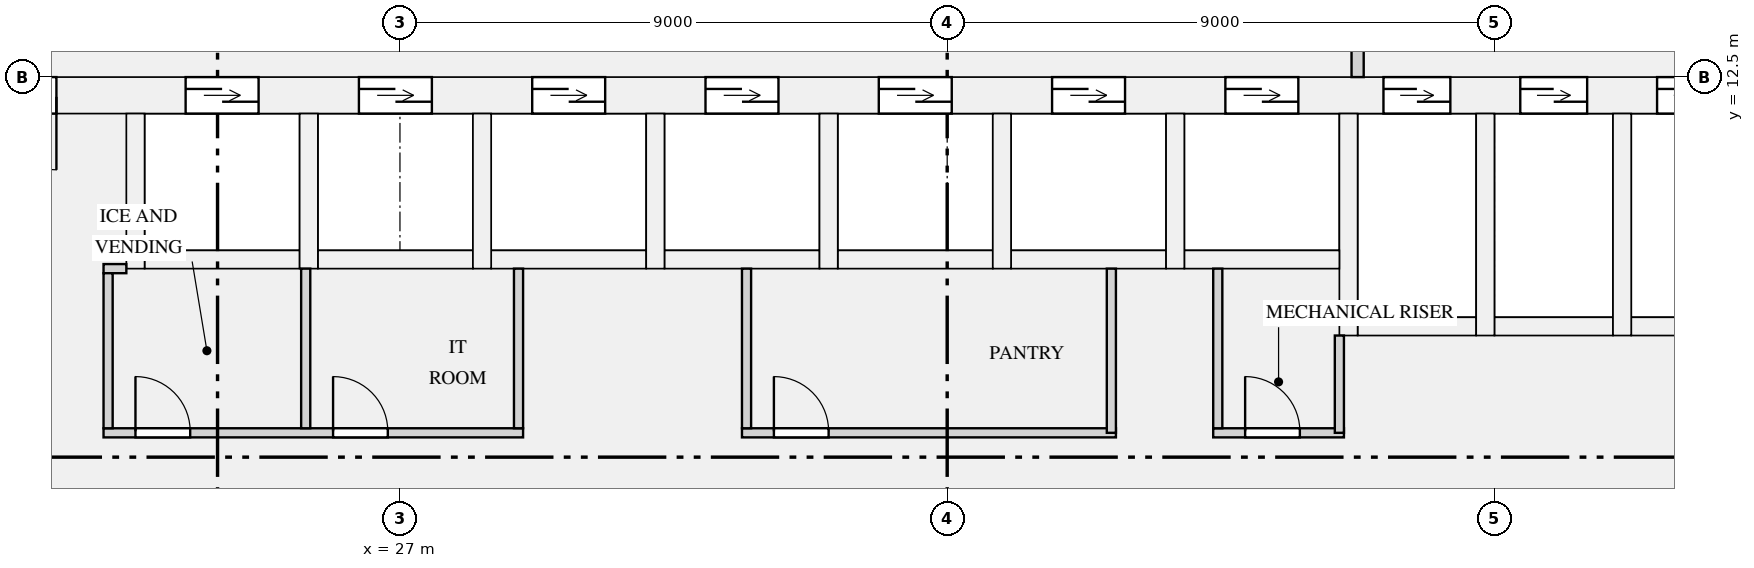
"""IFC4 building model, lengths in metres.
Left out: names, types, materials, properties, quantities, classifications, styles, units other than length and angle.
Written with IfcOpenShell. Run it as: python <this file> out.ifc"""

import sys

from ifc_helpers import new_model, si_unit, direction, frame, frame_2d, origin, place, context, subcontext, project, spatial, rectangle, extrude, element, fill, save


model = new_model("IFC4")
c1 = context("Model", 3, precision=1e-05, world=origin(), true_north=direction((0.0, 1.0)))
c2 = subcontext(c1, "Body", "Model", "MODEL_VIEW")
j1 = project(units=[si_unit("LENGTHUNIT", "METRE"), si_unit("PLANEANGLEUNIT", "RADIAN")], contexts=[c1])
p1 = place(None, origin())
s1 = spatial("IfcSite", under=j1, at=p1, CompositionType="ELEMENT")
p2 = place(p1, origin())
s2 = spatial("IfcBuilding", under=s1, at=p2, CompositionType="ELEMENT")
p3 = place(p2, frame((0.0, 0.0, 77.25)))
s3 = spatial("IfcBuildingStorey", under=s2, at=p3, CompositionType="ELEMENT", Elevation=77.25)
p4 = place(p3, frame((18.8, 12.2, 0.0), z_axis=(0.0, 0.0, 1.0), x_axis=(1.0, 0.0, 0.0)))
e1 = element("IfcWall", 1, at=p4, inside=s3, PredefinedType="SHEAR", context=c2, shape_type="SweptSolid", body=[
    extrude(rectangle(XDim=34.4, YDim=0.6, at=frame_2d((17.2, 0.0))), origin(), (0.0, 0.0, 1.0), 6.3),
])
p5 = place(p4, frame((4.675, 0.0, 0.0)))
e2 = element("IfcOpeningElement", 2, at=p5, cuts=e1, PredefinedType="OPENING", context=c2, shape_type="SweptSolid", body=[
    extrude(rectangle(XDim=1.2, YDim=2.1, at=frame_2d((0.6, 1.05))), frame((0.0, 0.31, 0.0), z_axis=(0.0, -1.0, 0.0), x_axis=(1.0, 0.0, 0.0)), (0.0, 0.0, 1.0), 0.62),
])
p6 = place(p4, frame((7.525, 0.0, 0.0)))
e3 = element("IfcOpeningElement", 3, at=p6, cuts=e1, PredefinedType="OPENING", context=c2, shape_type="SweptSolid", body=[
    extrude(rectangle(XDim=1.2, YDim=2.1, at=frame_2d((0.6, 1.05))), frame((0.0, 0.31, 0.0), z_axis=(0.0, -1.0, 0.0), x_axis=(1.0, 0.0, 0.0)), (0.0, 0.0, 1.0), 0.62),
])
p7 = place(p4, frame((10.375, 0.0, 0.0)))
e4 = element("IfcOpeningElement", 4, at=p7, cuts=e1, PredefinedType="OPENING", context=c2, shape_type="SweptSolid", body=[
    extrude(rectangle(XDim=1.2, YDim=2.1, at=frame_2d((0.6, 1.05))), frame((0.0, 0.31, 0.0), z_axis=(0.0, -1.0, 0.0), x_axis=(1.0, 0.0, 0.0)), (0.0, 0.0, 1.0), 0.62),
])
p8 = place(p4, frame((13.225, 0.0, 0.0)))
e5 = element("IfcOpeningElement", 5, at=p8, cuts=e1, PredefinedType="OPENING", context=c2, shape_type="SweptSolid", body=[
    extrude(rectangle(XDim=1.2, YDim=2.1, at=frame_2d((0.6, 1.05))), frame((0.0, 0.31, 0.0), z_axis=(0.0, -1.0, 0.0), x_axis=(1.0, 0.0, 0.0)), (0.0, 0.0, 1.0), 0.62),
])
p9 = place(p4, frame((16.075, 0.0, 0.0)))
e6 = element("IfcOpeningElement", 6, at=p9, cuts=e1, PredefinedType="OPENING", context=c2, shape_type="SweptSolid", body=[
    extrude(rectangle(XDim=1.2, YDim=2.1, at=frame_2d((0.6, 1.05))), frame((0.0, 0.31, 0.0), z_axis=(0.0, -1.0, 0.0), x_axis=(1.0, 0.0, 0.0)), (0.0, 0.0, 1.0), 0.62),
])
p10 = place(p4, frame((18.925, 0.0, 0.0)))
e7 = element("IfcOpeningElement", 7, at=p10, cuts=e1, PredefinedType="OPENING", context=c2, shape_type="SweptSolid", body=[
    extrude(rectangle(XDim=1.2, YDim=2.1, at=frame_2d((0.6, 1.05))), frame((0.0, 0.31, 0.0), z_axis=(0.0, -1.0, 0.0), x_axis=(1.0, 0.0, 0.0)), (0.0, 0.0, 1.0), 0.62),
])
p11 = place(p4, frame((21.775, 0.0, 0.0)))
e8 = element("IfcOpeningElement", 8, at=p11, cuts=e1, PredefinedType="OPENING", context=c2, shape_type="SweptSolid", body=[
    extrude(rectangle(XDim=1.2, YDim=2.1, at=frame_2d((0.6, 1.05))), frame((0.0, 0.31, 0.0), z_axis=(0.0, -1.0, 0.0), x_axis=(1.0, 0.0, 0.0)), (0.0, 0.0, 1.0), 0.62),
])
p12 = place(p4, frame((24.375, 0.0, 0.0)))
e9 = element("IfcOpeningElement", 9, at=p12, cuts=e1, PredefinedType="OPENING", context=c2, shape_type="SweptSolid", body=[
    extrude(rectangle(XDim=1.1, YDim=2.1, at=frame_2d((0.55, 1.05))), frame((0.0, 0.31, 0.0), z_axis=(0.0, -1.0, 0.0), x_axis=(1.0, 0.0, 0.0)), (0.0, 0.0, 1.0), 0.62),
])
p13 = place(p4, frame((26.625, 0.0, 0.0)))
e10 = element("IfcOpeningElement", 10, at=p13, cuts=e1, PredefinedType="OPENING", context=c2, shape_type="SweptSolid", body=[
    extrude(rectangle(XDim=1.1, YDim=2.1, at=frame_2d((0.55, 1.05))), frame((0.0, 0.31, 0.0), z_axis=(0.0, -1.0, 0.0), x_axis=(1.0, 0.0, 0.0)), (0.0, 0.0, 1.0), 0.62),
])
p14 = place(p4, frame((28.875, 0.0, 0.0)))
e11 = element("IfcOpeningElement", 11, at=p14, cuts=e1, PredefinedType="OPENING", context=c2, shape_type="SweptSolid", body=[
    extrude(rectangle(XDim=1.1, YDim=2.1, at=frame_2d((0.55, 1.05))), frame((0.0, 0.31, 0.0), z_axis=(0.0, -1.0, 0.0), x_axis=(1.0, 0.0, 0.0)), (0.0, 0.0, 1.0), 0.62),
])
p15 = place(p4, frame((1.35, 0.0, 0.0)))
e12 = element("IfcOpeningElement", 12, at=p15, cuts=e1, PredefinedType="OPENING", context=c2, shape_type="SweptSolid", body=[
    extrude(rectangle(XDim=1.2, YDim=2.1, at=frame_2d((0.6, 1.05))), frame((0.0, 0.31, 0.0), z_axis=(0.0, -1.0, 0.0), x_axis=(1.0, 0.0, 0.0)), (0.0, 0.0, 1.0), 0.62),
])
p16 = place(p4, frame((31.85, 0.0, 0.0)))
e13 = element("IfcOpeningElement", 13, at=p16, cuts=e1, PredefinedType="OPENING", context=c2, shape_type="SweptSolid", body=[
    extrude(rectangle(XDim=1.2, YDim=2.1, at=frame_2d((0.6, 1.05))), frame((0.0, 0.31, 0.0), z_axis=(0.0, -1.0, 0.0), x_axis=(1.0, 0.0, 0.0)), (0.0, 0.0, 1.0), 0.62),
])
p17 = place(p3, frame((22.8, 9.5, 0.0), z_axis=(0.0, 0.0, 1.0), x_axis=(1.0, 0.0, 0.0)))
e14 = element("IfcWall", 14, at=p17, inside=s3, PredefinedType="SHEAR", context=c2, shape_type="SweptSolid", body=[
    extrude(rectangle(XDim=2.55, YDim=0.3, at=frame_2d((1.275, 0.0))), origin(), (0.0, 0.0, 1.0), 6.3),
])
p18 = place(p3, frame((22.65, 9.35, 0.0), z_axis=(0.0, 0.0, 1.0), x_axis=(0.0, 1.0, 0.0)))
e15 = element("IfcWall", 15, at=p18, inside=s3, PredefinedType="SHEAR", context=c2, shape_type="SweptSolid", body=[
    extrude(rectangle(XDim=2.55, YDim=0.3, at=frame_2d((1.275, 0.0))), origin(), (0.0, 0.0, 1.0), 6.3),
])
p19 = place(p3, frame((25.65, 9.5, 0.0), z_axis=(0.0, 0.0, 1.0), x_axis=(1.0, 0.0, 0.0)))
e16 = element("IfcWall", 16, at=p19, inside=s3, PredefinedType="SHEAR", context=c2, shape_type="SweptSolid", body=[
    extrude(rectangle(XDim=2.55, YDim=0.3, at=frame_2d((1.275, 0.0))), origin(), (0.0, 0.0, 1.0), 6.3),
])
p20 = place(p3, frame((25.5, 9.35, 0.0), z_axis=(0.0, 0.0, 1.0), x_axis=(0.0, 1.0, 0.0)))
e17 = element("IfcWall", 17, at=p20, inside=s3, PredefinedType="SHEAR", context=c2, shape_type="SweptSolid", body=[
    extrude(rectangle(XDim=2.55, YDim=0.3, at=frame_2d((1.275, 0.0))), origin(), (0.0, 0.0, 1.0), 6.3),
])
p21 = place(p3, frame((28.5, 9.5, 0.0), z_axis=(0.0, 0.0, 1.0), x_axis=(1.0, 0.0, 0.0)))
e18 = element("IfcWall", 18, at=p21, inside=s3, PredefinedType="SHEAR", context=c2, shape_type="SweptSolid", body=[
    extrude(rectangle(XDim=2.55, YDim=0.3, at=frame_2d((1.275, 0.0))), origin(), (0.0, 0.0, 1.0), 6.3),
])
for number, where, z_axis, x_axis in (
    (19, (28.35, 9.35, 0.0), (0.0, 0.0, 1.0), (0.0, 1.0, 0.0)),
    (20, (31.35, 9.5, 0.0), (0.0, 0.0, 1.0), (1.0, 0.0, 0.0)),
    (21, (31.2, 9.35, 0.0), (0.0, 0.0, 1.0), (0.0, 1.0, 0.0)),
):
    element("IfcWall", number, at=place(p3, frame(where, z_axis=z_axis, x_axis=x_axis)), inside=s3, PredefinedType="SHEAR", context=c2, shape_type="SweptSolid", body=[
        extrude(rectangle(XDim=2.55, YDim=0.3, at=frame_2d((1.275, 0.0))), origin(), (0.0, 0.0, 1.0), 6.3),
    ])
p22 = place(p3, frame((34.2, 9.5, 0.0), z_axis=(0.0, 0.0, 1.0), x_axis=(1.0, 0.0, 0.0)))
e22 = element("IfcWall", 22, at=p22, inside=s3, PredefinedType="SHEAR", context=c2, shape_type="SweptSolid", body=[
    extrude(rectangle(XDim=2.55, YDim=0.3, at=frame_2d((1.275, 0.0))), origin(), (0.0, 0.0, 1.0), 6.3),
])
p23 = place(p3, frame((34.05, 9.35, 0.0), z_axis=(0.0, 0.0, 1.0), x_axis=(0.0, 1.0, 0.0)))
e23 = element("IfcWall", 23, at=p23, inside=s3, PredefinedType="SHEAR", context=c2, shape_type="SweptSolid", body=[
    extrude(rectangle(XDim=2.55, YDim=0.3, at=frame_2d((1.275, 0.0))), origin(), (0.0, 0.0, 1.0), 6.3),
])
p24 = place(p3, frame((37.05, 9.5, 0.0), z_axis=(0.0, 0.0, 1.0), x_axis=(1.0, 0.0, 0.0)))
e24 = element("IfcWall", 24, at=p24, inside=s3, PredefinedType="SHEAR", context=c2, shape_type="SweptSolid", body=[
    extrude(rectangle(XDim=2.55, YDim=0.3, at=frame_2d((1.275, 0.0))), origin(), (0.0, 0.0, 1.0), 6.3),
])
p25 = place(p3, frame((36.9, 9.35, 0.0), z_axis=(0.0, 0.0, 1.0), x_axis=(0.0, 1.0, 0.0)))
e25 = element("IfcWall", 25, at=p25, inside=s3, PredefinedType="SHEAR", context=c2, shape_type="SweptSolid", body=[
    extrude(rectangle(XDim=2.55, YDim=0.3, at=frame_2d((1.275, 0.0))), origin(), (0.0, 0.0, 1.0), 6.3),
])
p26 = place(p3, frame((39.9, 9.5, 0.0), z_axis=(0.0, 0.0, 1.0), x_axis=(1.0, 0.0, 0.0)))
e26 = element("IfcWall", 26, at=p26, inside=s3, PredefinedType="SHEAR", context=c2, shape_type="SweptSolid", body=[
    extrude(rectangle(XDim=2.55, YDim=0.3, at=frame_2d((1.275, 0.0))), origin(), (0.0, 0.0, 1.0), 6.3),
])
p27 = place(p3, frame((39.75, 9.35, 0.0), z_axis=(0.0, 0.0, 1.0), x_axis=(0.0, 1.0, 0.0)))
e27 = element("IfcWall", 27, at=p27, inside=s3, PredefinedType="SHEAR", context=c2, shape_type="SweptSolid", body=[
    extrude(rectangle(XDim=2.55, YDim=0.3, at=frame_2d((1.275, 0.0))), origin(), (0.0, 0.0, 1.0), 6.3),
])
p28 = place(p3, frame((42.75, 8.4, 0.0), z_axis=(0.0, 0.0, 1.0), x_axis=(1.0, 0.0, 0.0)))
e28 = element("IfcWall", 28, at=p28, inside=s3, PredefinedType="SHEAR", context=c2, shape_type="SweptSolid", body=[
    extrude(rectangle(XDim=1.95, YDim=0.3, at=frame_2d((0.975, 0.0))), origin(), (0.0, 0.0, 1.0), 6.3),
])
p29 = place(p3, frame((42.6, 8.25, 0.0), z_axis=(0.0, 0.0, 1.0), x_axis=(0.0, 1.0, 0.0)))
e29 = element("IfcWall", 29, at=p29, inside=s3, PredefinedType="SHEAR", context=c2, shape_type="SweptSolid", body=[
    extrude(rectangle(XDim=3.65, YDim=0.3, at=frame_2d((1.825, 0.0))), origin(), (0.0, 0.0, 1.0), 6.3),
])
p30 = place(p3, frame((45.0, 8.4, 0.0), z_axis=(0.0, 0.0, 1.0), x_axis=(1.0, 0.0, 0.0)))
e30 = element("IfcWall", 30, at=p30, inside=s3, PredefinedType="SHEAR", context=c2, shape_type="SweptSolid", body=[
    extrude(rectangle(XDim=1.95, YDim=0.3, at=frame_2d((0.975, 0.0))), origin(), (0.0, 0.0, 1.0), 6.3),
])
p31 = place(p3, frame((44.85, 8.25, 0.0), z_axis=(0.0, 0.0, 1.0), x_axis=(0.0, 1.0, 0.0)))
e31 = element("IfcWall", 31, at=p31, inside=s3, PredefinedType="SHEAR", context=c2, shape_type="SweptSolid", body=[
    extrude(rectangle(XDim=3.65, YDim=0.3, at=frame_2d((1.825, 0.0))), origin(), (0.0, 0.0, 1.0), 6.3),
])
p32 = place(p3, frame((47.25, 8.4, 0.0), z_axis=(0.0, 0.0, 1.0), x_axis=(1.0, 0.0, 0.0)))
e32 = element("IfcWall", 32, at=p32, inside=s3, PredefinedType="SHEAR", context=c2, shape_type="SweptSolid", body=[
    extrude(rectangle(XDim=1.95, YDim=0.3, at=frame_2d((0.975, 0.0))), origin(), (0.0, 0.0, 1.0), 6.3),
])
p33 = place(p3, frame((47.1, 8.25, 0.0), z_axis=(0.0, 0.0, 1.0), x_axis=(0.0, 1.0, 0.0)))
e33 = element("IfcWall", 33, at=p33, inside=s3, PredefinedType="SHEAR", context=c2, shape_type="SweptSolid", body=[
    extrude(rectangle(XDim=3.65, YDim=0.3, at=frame_2d((1.825, 0.0))), origin(), (0.0, 0.0, 1.0), 6.3),
])
p34 = place(p3, frame((22.125, 6.65, 0.0), z_axis=(0.0, 0.0, 1.0), x_axis=(1.0, 0.0, 0.0)))
e34 = element("IfcWall", 34, at=p34, inside=s3, PredefinedType="PARTITIONING", context=c2, shape_type="SweptSolid", body=[
    extrude(rectangle(XDim=6.9, YDim=0.15, at=frame_2d((3.45, 0.0))), origin(), (0.0, 0.0, 1.0), 5.98),
])
p35 = place(p34, frame((0.525, 0.0, 0.0)))
e35 = element("IfcOpeningElement", 35, at=p35, cuts=e34, PredefinedType="OPENING", context=c2, shape_type="SweptSolid", body=[
    extrude(rectangle(XDim=0.9, YDim=2.1, at=frame_2d((0.45, 1.05))), frame((0.0, 0.085, 0.0), z_axis=(0.0, -1.0, 0.0), x_axis=(1.0, 0.0, 0.0)), (0.0, 0.0, 1.0), 0.17),
])
p36 = place(p34, frame((3.775, 0.0, 0.0)))
e36 = element("IfcOpeningElement", 36, at=p36, cuts=e34, PredefinedType="OPENING", context=c2, shape_type="SweptSolid", body=[
    extrude(rectangle(XDim=0.9, YDim=2.1, at=frame_2d((0.45, 1.05))), frame((0.0, 0.085, 0.0), z_axis=(0.0, -1.0, 0.0), x_axis=(1.0, 0.0, 0.0)), (0.0, 0.0, 1.0), 0.17),
])
p37 = place(p3, frame((32.625, 6.65, 0.0), z_axis=(0.0, 0.0, 1.0), x_axis=(1.0, 0.0, 0.0)))
e37 = element("IfcWall", 37, at=p37, inside=s3, PredefinedType="PARTITIONING", context=c2, shape_type="SweptSolid", body=[
    extrude(rectangle(XDim=6.15, YDim=0.15, at=frame_2d((3.075, 0.0))), origin(), (0.0, 0.0, 1.0), 5.98),
])
p38 = place(p37, frame((0.525, 0.0, 0.0)))
e38 = element("IfcOpeningElement", 38, at=p38, cuts=e37, PredefinedType="OPENING", context=c2, shape_type="SweptSolid", body=[
    extrude(rectangle(XDim=0.9, YDim=2.1, at=frame_2d((0.45, 1.05))), frame((0.0, 0.085, 0.0), z_axis=(0.0, -1.0, 0.0), x_axis=(1.0, 0.0, 0.0)), (0.0, 0.0, 1.0), 0.17),
])
p39 = place(p3, frame((40.375, 6.65, 0.0), z_axis=(0.0, 0.0, 1.0), x_axis=(1.0, 0.0, 0.0)))
e39 = element("IfcWall", 39, at=p39, inside=s3, PredefinedType="PARTITIONING", context=c2, shape_type="SweptSolid", body=[
    extrude(rectangle(XDim=2.15, YDim=0.15, at=frame_2d((1.075, 0.0))), origin(), (0.0, 0.0, 1.0), 5.98),
])
p40 = place(p39, frame((0.525, 0.0, 0.0)))
e40 = element("IfcOpeningElement", 40, at=p40, cuts=e39, PredefinedType="OPENING", context=c2, shape_type="SweptSolid", body=[
    extrude(rectangle(XDim=0.9, YDim=2.1, at=frame_2d((0.45, 1.05))), frame((0.0, 0.085, 0.0), z_axis=(0.0, -1.0, 0.0), x_axis=(1.0, 0.0, 0.0)), (0.0, 0.0, 1.0), 0.17),
])
p41 = place(p3, frame((22.125, 9.35, 0.0), z_axis=(0.0, 0.0, 1.0), x_axis=(1.0, 0.0, 0.0)))
e41 = element("IfcWall", 41, at=p41, inside=s3, PredefinedType="PARTITIONING", context=c2, shape_type="SweptSolid", body=[
    extrude(rectangle(XDim=0.375, YDim=0.15, at=frame_2d((0.188, 0.0))), origin(), (0.0, 0.0, 1.0), 5.98),
])
p42 = place(p3, frame((38.7, 6.65, 0.0), z_axis=(0.0, 0.0, 1.0), x_axis=(0.0, 1.0, 0.0)))
e42 = element("IfcWall", 42, at=p42, inside=s3, PredefinedType="PARTITIONING", context=c2, shape_type="SweptSolid", body=[
    extrude(rectangle(XDim=2.7, YDim=0.15, at=frame_2d((1.35, 0.0))), origin(), (0.0, 0.0, 1.0), 5.98),
])
p43 = place(p3, frame((42.45, 6.65, 0.0), z_axis=(0.0, 0.0, 1.0), x_axis=(0.0, 1.0, 0.0)))
e43 = element("IfcWall", 43, at=p43, inside=s3, PredefinedType="PARTITIONING", context=c2, shape_type="SweptSolid", body=[
    extrude(rectangle(XDim=1.6, YDim=0.15, at=frame_2d((0.8, 0.0))), origin(), (0.0, 0.0, 1.0), 5.98),
])
p44 = place(p3, frame((22.2, 6.725, 0.0), z_axis=(0.0, 0.0, 1.0), x_axis=(0.0, 1.0, 0.0)))
e44 = element("IfcWall", 44, at=p44, inside=s3, PredefinedType="PARTITIONING", context=c2, shape_type="SweptSolid", body=[
    extrude(rectangle(XDim=2.55, YDim=0.15, at=frame_2d((1.275, 0.0))), origin(), (0.0, 0.0, 1.0), 5.98),
])
for number, where, z_axis, x_axis in (
    (45, (25.45, 6.725, 0.0), (0.0, 0.0, 1.0), (0.0, 1.0, 0.0)),
    (46, (28.95, 6.725, 0.0), (0.0, 0.0, 1.0), (0.0, 1.0, 0.0)),
    (47, (32.7, 6.725, 0.0), (0.0, 0.0, 1.0), (0.0, 1.0, 0.0)),
    (48, (40.45, 6.725, 0.0), (0.0, 0.0, 1.0), (0.0, 1.0, 0.0)),
):
    element("IfcWall", number, at=place(p3, frame(where, z_axis=z_axis, x_axis=x_axis)), inside=s3, PredefinedType="PARTITIONING", context=c2, shape_type="SweptSolid", body=[
        extrude(rectangle(XDim=2.625, YDim=0.15, at=frame_2d((1.312, 0.0))), origin(), (0.0, 0.0, 1.0), 5.98),
    ])
p45 = place(p3, frame((42.75, 12.5, 0.0), z_axis=(0.0, 0.0, 1.0), x_axis=(0.0, 1.0, 0.0)))
e49 = element("IfcWall", 49, at=p45, inside=s3, PredefinedType="PARTITIONING", context=c2, shape_type="SweptSolid", body=[
    extrude(rectangle(XDim=3.4, YDim=0.2, at=frame_2d((1.7, 0.0))), origin(), (0.0, 0.0, 1.0), 5.98),
])
p46 = place(p45, frame((2.2, 0.0, 0.0)))
e50 = element("IfcOpeningElement", 50, at=p46, cuts=e49, PredefinedType="OPENING", context=c2, shape_type="SweptSolid", body=[
    extrude(rectangle(XDim=1.0, YDim=2.1, at=frame_2d((0.5, 1.05))), frame((0.0, 0.11, 0.0), z_axis=(0.0, -1.0, 0.0), x_axis=(1.0, 0.0, 0.0)), (0.0, 0.0, 1.0), 0.22),
])
p47 = place(p5, origin())
e51 = element("IfcDoor", 51, at=p47, inside=s3, OperationType="DOUBLE_DOOR_SLIDING", PredefinedType="DOOR", context=c2, shape_type="SweptSolid", body=[
    extrude(rectangle(XDim=1.2, YDim=2.1, at=frame_2d((0.6, 1.05))), frame((0.0, 0.025, 0.0), z_axis=(0.0, -1.0, 0.0), x_axis=(1.0, 0.0, 0.0)), (0.0, 0.0, 1.0), 0.05),
])
fill(e2, e51)
p48 = place(p6, origin())
e52 = element("IfcDoor", 52, at=p48, inside=s3, OperationType="DOUBLE_DOOR_SLIDING", PredefinedType="DOOR", context=c2, shape_type="SweptSolid", body=[
    extrude(rectangle(XDim=1.2, YDim=2.1, at=frame_2d((0.6, 1.05))), frame((0.0, 0.025, 0.0), z_axis=(0.0, -1.0, 0.0), x_axis=(1.0, 0.0, 0.0)), (0.0, 0.0, 1.0), 0.05),
])
fill(e3, e52)
p49 = place(p7, origin())
e53 = element("IfcDoor", 53, at=p49, inside=s3, OperationType="DOUBLE_DOOR_SLIDING", PredefinedType="DOOR", context=c2, shape_type="SweptSolid", body=[
    extrude(rectangle(XDim=1.2, YDim=2.1, at=frame_2d((0.6, 1.05))), frame((0.0, 0.025, 0.0), z_axis=(0.0, -1.0, 0.0), x_axis=(1.0, 0.0, 0.0)), (0.0, 0.0, 1.0), 0.05),
])
fill(e4, e53)
p50 = place(p8, origin())
e54 = element("IfcDoor", 54, at=p50, inside=s3, OperationType="DOUBLE_DOOR_SLIDING", PredefinedType="DOOR", context=c2, shape_type="SweptSolid", body=[
    extrude(rectangle(XDim=1.2, YDim=2.1, at=frame_2d((0.6, 1.05))), frame((0.0, 0.025, 0.0), z_axis=(0.0, -1.0, 0.0), x_axis=(1.0, 0.0, 0.0)), (0.0, 0.0, 1.0), 0.05),
])
fill(e5, e54)
p51 = place(p9, origin())
e55 = element("IfcDoor", 55, at=p51, inside=s3, OperationType="DOUBLE_DOOR_SLIDING", PredefinedType="DOOR", context=c2, shape_type="SweptSolid", body=[
    extrude(rectangle(XDim=1.2, YDim=2.1, at=frame_2d((0.6, 1.05))), frame((0.0, 0.025, 0.0), z_axis=(0.0, -1.0, 0.0), x_axis=(1.0, 0.0, 0.0)), (0.0, 0.0, 1.0), 0.05),
])
fill(e6, e55)
p52 = place(p10, origin())
e56 = element("IfcDoor", 56, at=p52, inside=s3, OperationType="DOUBLE_DOOR_SLIDING", PredefinedType="DOOR", context=c2, shape_type="SweptSolid", body=[
    extrude(rectangle(XDim=1.2, YDim=2.1, at=frame_2d((0.6, 1.05))), frame((0.0, 0.025, 0.0), z_axis=(0.0, -1.0, 0.0), x_axis=(1.0, 0.0, 0.0)), (0.0, 0.0, 1.0), 0.05),
])
fill(e7, e56)
p53 = place(p11, origin())
e57 = element("IfcDoor", 57, at=p53, inside=s3, OperationType="DOUBLE_DOOR_SLIDING", PredefinedType="DOOR", context=c2, shape_type="SweptSolid", body=[
    extrude(rectangle(XDim=1.2, YDim=2.1, at=frame_2d((0.6, 1.05))), frame((0.0, 0.025, 0.0), z_axis=(0.0, -1.0, 0.0), x_axis=(1.0, 0.0, 0.0)), (0.0, 0.0, 1.0), 0.05),
])
fill(e8, e57)
p54 = place(p12, origin())
e58 = element("IfcDoor", 58, at=p54, inside=s3, OperationType="DOUBLE_DOOR_SLIDING", PredefinedType="DOOR", context=c2, shape_type="SweptSolid", body=[
    extrude(rectangle(XDim=1.1, YDim=2.1, at=frame_2d((0.55, 1.05))), frame((0.0, 0.025, 0.0), z_axis=(0.0, -1.0, 0.0), x_axis=(1.0, 0.0, 0.0)), (0.0, 0.0, 1.0), 0.05),
])
fill(e9, e58)
p55 = place(p13, origin())
e59 = element("IfcDoor", 59, at=p55, inside=s3, OperationType="DOUBLE_DOOR_SLIDING", PredefinedType="DOOR", context=c2, shape_type="SweptSolid", body=[
    extrude(rectangle(XDim=1.1, YDim=2.1, at=frame_2d((0.55, 1.05))), frame((0.0, 0.025, 0.0), z_axis=(0.0, -1.0, 0.0), x_axis=(1.0, 0.0, 0.0)), (0.0, 0.0, 1.0), 0.05),
])
fill(e10, e59)
p56 = place(p14, origin())
e60 = element("IfcDoor", 60, at=p56, inside=s3, OperationType="DOUBLE_DOOR_SLIDING", PredefinedType="DOOR", context=c2, shape_type="SweptSolid", body=[
    extrude(rectangle(XDim=1.1, YDim=2.1, at=frame_2d((0.55, 1.05))), frame((0.0, 0.025, 0.0), z_axis=(0.0, -1.0, 0.0), x_axis=(1.0, 0.0, 0.0)), (0.0, 0.0, 1.0), 0.05),
])
fill(e11, e60)
p57 = place(p35, origin())
e61 = element("IfcDoor", 61, at=p57, inside=s3, OperationType="SINGLE_SWING_LEFT", PredefinedType="DOOR", context=c2, shape_type="SweptSolid", body=[
    extrude(rectangle(XDim=0.9, YDim=2.1, at=frame_2d((0.45, 1.05))), frame((0.0, 0.025, 0.0), z_axis=(0.0, -1.0, 0.0), x_axis=(1.0, 0.0, 0.0)), (0.0, 0.0, 1.0), 0.05),
])
fill(e35, e61)
p58 = place(p36, origin())
e62 = element("IfcDoor", 62, at=p58, inside=s3, OperationType="SINGLE_SWING_LEFT", PredefinedType="DOOR", context=c2, shape_type="SweptSolid", body=[
    extrude(rectangle(XDim=0.9, YDim=2.1, at=frame_2d((0.45, 1.05))), frame((0.0, 0.025, 0.0), z_axis=(0.0, -1.0, 0.0), x_axis=(1.0, 0.0, 0.0)), (0.0, 0.0, 1.0), 0.05),
])
fill(e36, e62)
p59 = place(p38, origin())
e63 = element("IfcDoor", 63, at=p59, inside=s3, OperationType="SINGLE_SWING_LEFT", PredefinedType="DOOR", context=c2, shape_type="SweptSolid", body=[
    extrude(rectangle(XDim=0.9, YDim=2.1, at=frame_2d((0.45, 1.05))), frame((0.0, 0.025, 0.0), z_axis=(0.0, -1.0, 0.0), x_axis=(1.0, 0.0, 0.0)), (0.0, 0.0, 1.0), 0.05),
])
fill(e38, e63)
p60 = place(p40, origin())
e64 = element("IfcDoor", 64, at=p60, inside=s3, OperationType="SINGLE_SWING_LEFT", PredefinedType="DOOR", context=c2, shape_type="SweptSolid", body=[
    extrude(rectangle(XDim=0.9, YDim=2.1, at=frame_2d((0.45, 1.05))), frame((0.0, 0.025, 0.0), z_axis=(0.0, -1.0, 0.0), x_axis=(1.0, 0.0, 0.0)), (0.0, 0.0, 1.0), 0.05),
])
fill(e40, e64)
p61 = place(p15, frame((1.2, 0.0, 0.0), z_axis=(0.0, 0.0, 1.0), x_axis=(-1.0, 0.0, 0.0)))
e65 = element("IfcDoor", 65, at=p61, inside=s3, OperationType="SINGLE_SWING_LEFT", PredefinedType="DOOR", context=c2, shape_type="SweptSolid", body=[
    extrude(rectangle(XDim=1.2, YDim=2.1, at=frame_2d((0.6, 1.05))), frame((0.0, 0.025, 0.0), z_axis=(0.0, -1.0, 0.0), x_axis=(1.0, 0.0, 0.0)), (0.0, 0.0, 1.0), 0.05),
])
fill(e12, e65)
save(model, sys.argv[1])
